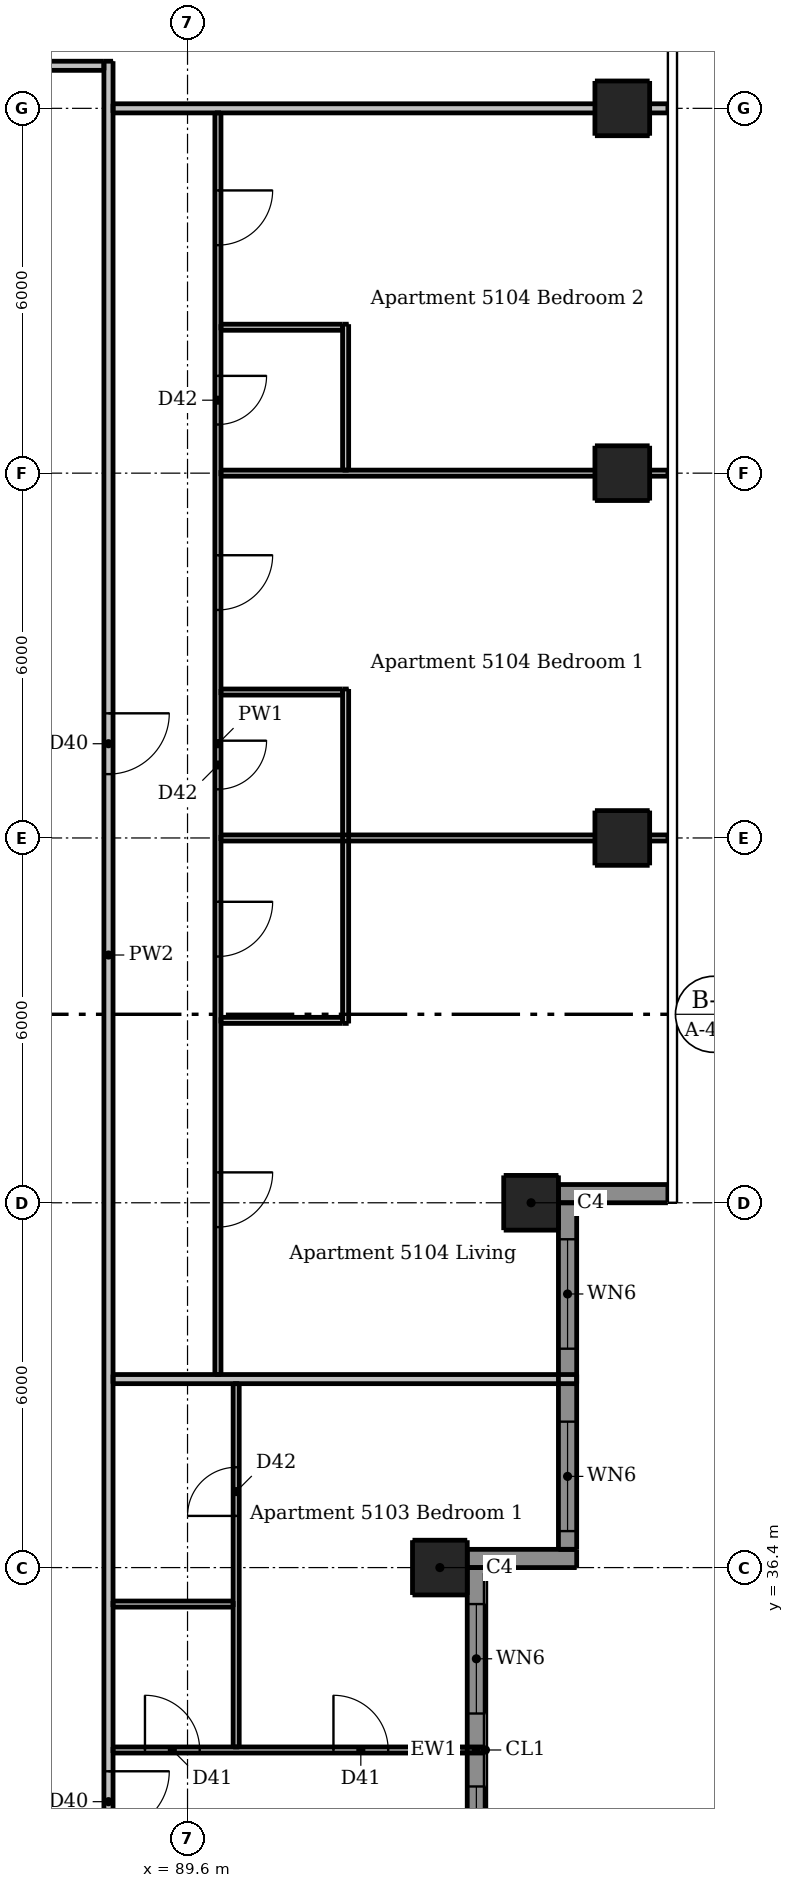
"""IFC4 building model, lengths in metres.
Left out: names, types, materials, properties, quantities, classifications, styles, units other than length and angle.
Written with IfcOpenShell. Run it as: python <this file> out.ifc"""

import sys

from ifc_helpers import new_model, si_unit, direction, frame, frame_2d, origin, origin_2d, place, context, subcontext, project, spatial, rectangle, extrude, element, fill, save


model = new_model("IFC4")
c1 = context("Model", 3, precision=1e-05, world=origin(), true_north=direction((0.0, 1.0)))
c2 = subcontext(c1, "Body", "Model", "MODEL_VIEW")
j1 = project(units=[si_unit("LENGTHUNIT", "METRE"), si_unit("PLANEANGLEUNIT", "RADIAN")], contexts=[c1])
p1 = place(None, origin())
s1 = spatial("IfcSite", under=j1, at=p1, CompositionType="ELEMENT")
p2 = place(p1, origin())
s2 = spatial("IfcBuilding", under=s1, at=p2, CompositionType="ELEMENT")
p3 = place(p2, frame((0.0, 0.0, 193.6)))
s3 = spatial("IfcBuildingStorey", under=s2, at=p3, CompositionType="ELEMENT", Elevation=193.6)
for number, where, z_axis, x_axis in (
    (1, (93.75, 36.4, 0.0), (0.0, 0.0, 1.0), (1.0, 0.0, 0.0)),
    (2, (95.25, 42.4, 0.0), (0.0, 0.0, 1.0), (1.0, 0.0, 0.0)),
    (3, (96.75, 48.4, 0.0), (0.0, 0.0, 1.0), (1.0, 0.0, 0.0)),
    (4, (96.75, 54.4, 0.0), (0.0, 0.0, 1.0), (1.0, 0.0, 0.0)),
    (5, (96.75, 60.4, 0.0), (0.0, 0.0, 1.0), (1.0, 0.0, 0.0)),
):
    element("IfcColumn", number, at=place(p3, frame(where, z_axis=z_axis, x_axis=x_axis)), inside=s3, PredefinedType="COLUMN", context=c2, shape_type="SweptSolid", body=[
        extrude(rectangle(XDim=0.9, YDim=0.9, at=origin_2d()), origin(), (0.0, 0.0, 1.0), 3.05),
    ])
for number, where, z_axis, x_axis in (
    (6, (94.2, 36.55, 0.0), (0.0, 0.0, 1.0), (1.0, 0.0, 0.0)),
    (7, (95.7, 42.55, 0.0), (0.0, 0.0, 1.0), (1.0, 0.0, 0.0)),
):
    element("IfcWall", number, at=place(p3, frame(where, z_axis=z_axis, x_axis=x_axis)), inside=s3, PredefinedType="SOLIDWALL", context=c2, shape_type="SweptSolid", body=[
        extrude(rectangle(XDim=1.8, YDim=0.3, at=frame_2d((0.9, 0.0))), origin(), (0.0, 0.0, 1.0), 3.05),
    ])
p4 = place(p3, frame((94.35, 30.4, 0.0), z_axis=(0.0, 0.0, 1.0), x_axis=(0.0, 1.0, 0.0)))
e8 = element("IfcWall", 8, at=p4, inside=s3, PredefinedType="SOLIDWALL", context=c2, shape_type="SweptSolid", body=[
    extrude(rectangle(XDim=6.0, YDim=0.3, at=frame_2d((3.0, 0.0))), origin(), (0.0, 0.0, 1.0), 3.05),
])
p5 = place(p4, frame((0.6, 0.0, 0.15)))
e9 = element("IfcOpeningElement", 9, at=p5, cuts=e8, PredefinedType="OPENING", context=c2, shape_type="SweptSolid", body=[
    extrude(rectangle(XDim=1.8, YDim=2.1, at=frame_2d((0.9, 1.05))), frame((0.0, 0.16, 0.0), z_axis=(0.0, -1.0, 0.0), x_axis=(1.0, 0.0, 0.0)), (0.0, 0.0, 1.0), 0.32),
])
p6 = place(p4, frame((3.6, 0.0, 0.15)))
e10 = element("IfcOpeningElement", 10, at=p6, cuts=e8, PredefinedType="OPENING", context=c2, shape_type="SweptSolid", body=[
    extrude(rectangle(XDim=1.8, YDim=2.1, at=frame_2d((0.9, 1.05))), frame((0.0, 0.16, 0.0), z_axis=(0.0, -1.0, 0.0), x_axis=(1.0, 0.0, 0.0)), (0.0, 0.0, 1.0), 0.32),
])
p7 = place(p3, frame((95.85, 36.7, 0.0), z_axis=(0.0, 0.0, 1.0), x_axis=(0.0, 1.0, 0.0)))
e11 = element("IfcWall", 11, at=p7, inside=s3, PredefinedType="SOLIDWALL", context=c2, shape_type="SweptSolid", body=[
    extrude(rectangle(XDim=5.7, YDim=0.3, at=frame_2d((2.85, 0.0))), origin(), (0.0, 0.0, 1.0), 3.05),
])
p8 = place(p7, frame((0.3, 0.0, 0.15)))
e12 = element("IfcOpeningElement", 12, at=p8, cuts=e11, PredefinedType="OPENING", context=c2, shape_type="SweptSolid", body=[
    extrude(rectangle(XDim=1.8, YDim=2.1, at=frame_2d((0.9, 1.05))), frame((0.0, 0.16, 0.0), z_axis=(0.0, -1.0, 0.0), x_axis=(1.0, 0.0, 0.0)), (0.0, 0.0, 1.0), 0.32),
])
p9 = place(p7, frame((3.3, 0.0, 0.15)))
e13 = element("IfcOpeningElement", 13, at=p9, cuts=e11, PredefinedType="OPENING", context=c2, shape_type="SweptSolid", body=[
    extrude(rectangle(XDim=1.8, YDim=2.1, at=frame_2d((0.9, 1.05))), frame((0.0, 0.16, 0.0), z_axis=(0.0, -1.0, 0.0), x_axis=(1.0, 0.0, 0.0)), (0.0, 0.0, 1.0), 0.32),
])
p10 = place(p3, frame((90.1, 60.325, 0.0), z_axis=(0.0, 0.0, 1.0), x_axis=(0.0, -1.0, 0.0)))
e14 = element("IfcWall", 14, at=p10, inside=s3, PredefinedType="PARTITIONING", context=c2, shape_type="SweptSolid", body=[
    extrude(rectangle(XDim=20.75, YDim=0.1, at=frame_2d((10.375, 0.0))), origin(), (0.0, 0.0, 1.0), 3.05),
])
p11 = place(p10, frame((17.425, 0.0, 0.0)))
e15 = element("IfcOpeningElement", 15, at=p11, cuts=e14, PredefinedType="OPENING", context=c2, shape_type="SweptSolid", body=[
    extrude(rectangle(XDim=0.9, YDim=2.1, at=frame_2d((0.45, 1.05))), frame((0.0, 0.06, 0.0), z_axis=(0.0, -1.0, 0.0), x_axis=(1.0, 0.0, 0.0)), (0.0, 0.0, 1.0), 0.12),
])
p12 = place(p10, frame((12.975, 0.0, 0.0)))
e16 = element("IfcOpeningElement", 16, at=p12, cuts=e14, PredefinedType="OPENING", context=c2, shape_type="SweptSolid", body=[
    extrude(rectangle(XDim=0.9, YDim=2.1, at=frame_2d((0.45, 1.05))), frame((0.0, 0.06, 0.0), z_axis=(0.0, -1.0, 0.0), x_axis=(1.0, 0.0, 0.0)), (0.0, 0.0, 1.0), 0.12),
])
p13 = place(p10, frame((7.275, 0.0, 0.0)))
e17 = element("IfcOpeningElement", 17, at=p13, cuts=e14, PredefinedType="OPENING", context=c2, shape_type="SweptSolid", body=[
    extrude(rectangle(XDim=0.9, YDim=2.1, at=frame_2d((0.45, 1.05))), frame((0.0, 0.06, 0.0), z_axis=(0.0, -1.0, 0.0), x_axis=(1.0, 0.0, 0.0)), (0.0, 0.0, 1.0), 0.12),
])
p14 = place(p10, frame((1.275, 0.0, 0.0)))
e18 = element("IfcOpeningElement", 18, at=p14, cuts=e14, PredefinedType="OPENING", context=c2, shape_type="SweptSolid", body=[
    extrude(rectangle(XDim=0.9, YDim=2.1, at=frame_2d((0.45, 1.05))), frame((0.0, 0.06, 0.0), z_axis=(0.0, -1.0, 0.0), x_axis=(1.0, 0.0, 0.0)), (0.0, 0.0, 1.0), 0.12),
])
p15 = place(p10, frame((10.325, 0.0, 0.0)))
e19 = element("IfcOpeningElement", 19, at=p15, cuts=e14, PredefinedType="OPENING", context=c2, shape_type="SweptSolid", body=[
    extrude(rectangle(XDim=0.8, YDim=2.1, at=frame_2d((0.4, 1.05))), frame((0.0, 0.06, 0.0), z_axis=(0.0, -1.0, 0.0), x_axis=(1.0, 0.0, 0.0)), (0.0, 0.0, 1.0), 0.12),
])
p16 = place(p10, frame((4.325, 0.0, 0.0)))
e20 = element("IfcOpeningElement", 20, at=p16, cuts=e14, PredefinedType="OPENING", context=c2, shape_type="SweptSolid", body=[
    extrude(rectangle(XDim=0.8, YDim=2.1, at=frame_2d((0.4, 1.05))), frame((0.0, 0.06, 0.0), z_axis=(0.0, -1.0, 0.0), x_axis=(1.0, 0.0, 0.0)), (0.0, 0.0, 1.0), 0.12),
])
p17 = place(p3, frame((90.4, 33.45, 0.0), z_axis=(0.0, 0.0, 1.0), x_axis=(0.0, 1.0, 0.0)))
e21 = element("IfcWall", 21, at=p17, inside=s3, PredefinedType="PARTITIONING", context=c2, shape_type="SweptSolid", body=[
    extrude(rectangle(XDim=5.975, YDim=0.1, at=frame_2d((2.988, 0.0))), origin(), (0.0, 0.0, 1.0), 3.05),
])
p18 = place(p17, frame((3.8, 0.0, 0.0)))
e22 = element("IfcOpeningElement", 22, at=p18, cuts=e21, PredefinedType="OPENING", context=c2, shape_type="SweptSolid", body=[
    extrude(rectangle(XDim=0.8, YDim=2.1, at=frame_2d((0.4, 1.05))), frame((0.0, 0.06, 0.0), z_axis=(0.0, -1.0, 0.0), x_axis=(1.0, 0.0, 0.0)), (0.0, 0.0, 1.0), 0.12),
])
p19 = place(p3, frame((92.2, 45.35, 0.0), z_axis=(0.0, 0.0, 1.0), x_axis=(0.0, 1.0, 0.0)))
e23 = element("IfcWall", 23, at=p19, inside=s3, PredefinedType="PARTITIONING", context=c2, shape_type="SweptSolid", body=[
    extrude(rectangle(XDim=5.5, YDim=0.1, at=frame_2d((2.75, 0.0))), origin(), (0.0, 0.0, 1.0), 3.05),
])
p20 = place(p3, frame((92.2, 54.45, 0.0), z_axis=(0.0, 0.0, 1.0), x_axis=(0.0, 1.0, 0.0)))
e24 = element("IfcWall", 24, at=p20, inside=s3, PredefinedType="PARTITIONING", context=c2, shape_type="SweptSolid", body=[
    extrude(rectangle(XDim=2.4, YDim=0.1, at=frame_2d((1.2, 0.0))), origin(), (0.0, 0.0, 1.0), 3.05),
])
p21 = place(p3, frame((90.15, 56.8, 0.0), z_axis=(0.0, 0.0, 1.0), x_axis=(1.0, 0.0, 0.0)))
e25 = element("IfcWall", 25, at=p21, inside=s3, PredefinedType="PARTITIONING", context=c2, shape_type="SweptSolid", body=[
    extrude(rectangle(XDim=2.0, YDim=0.1, at=frame_2d((1.0, 0.0))), origin(), (0.0, 0.0, 1.0), 3.05),
])
p22 = place(p3, frame((90.15, 54.4, 0.0), z_axis=(0.0, 0.0, 1.0), x_axis=(1.0, 0.0, 0.0)))
e26 = element("IfcWall", 26, at=p22, inside=s3, PredefinedType="PARTITIONING", context=c2, shape_type="SweptSolid", body=[
    extrude(rectangle(XDim=7.35, YDim=0.1, at=frame_2d((3.675, 0.0))), origin(), (0.0, 0.0, 1.0), 2.516),
])
p23 = place(p3, frame((90.15, 50.8, 0.0), z_axis=(0.0, 0.0, 1.0), x_axis=(1.0, 0.0, 0.0)))
e27 = element("IfcWall", 27, at=p23, inside=s3, PredefinedType="PARTITIONING", context=c2, shape_type="SweptSolid", body=[
    extrude(rectangle(XDim=2.0, YDim=0.1, at=frame_2d((1.0, 0.0))), origin(), (0.0, 0.0, 1.0), 3.05),
])
p24 = place(p3, frame((90.15, 48.4, 0.0), z_axis=(0.0, 0.0, 1.0), x_axis=(1.0, 0.0, 0.0)))
e28 = element("IfcWall", 28, at=p24, inside=s3, PredefinedType="PARTITIONING", context=c2, shape_type="SweptSolid", body=[
    extrude(rectangle(XDim=7.35, YDim=0.1, at=frame_2d((3.675, 0.0))), origin(), (0.0, 0.0, 1.0), 2.516),
])
p25 = place(p3, frame((90.15, 45.4, 0.0), z_axis=(0.0, 0.0, 1.0), x_axis=(1.0, 0.0, 0.0)))
e29 = element("IfcWall", 29, at=p25, inside=s3, PredefinedType="PARTITIONING", context=c2, shape_type="SweptSolid", body=[
    extrude(rectangle(XDim=2.0, YDim=0.1, at=frame_2d((1.0, 0.0))), origin(), (0.0, 0.0, 1.0), 3.05),
])
p26 = place(p3, frame((88.375, 35.8, 0.0), z_axis=(0.0, 0.0, 1.0), x_axis=(1.0, 0.0, 0.0)))
e30 = element("IfcWall", 30, at=p26, inside=s3, PredefinedType="PARTITIONING", context=c2, shape_type="SweptSolid", body=[
    extrude(rectangle(XDim=1.975, YDim=0.1, at=frame_2d((0.988, 0.0))), origin(), (0.0, 0.0, 1.0), 3.05),
])
p27 = place(p3, frame((88.375, 33.4, 0.0), z_axis=(0.0, 0.0, 1.0), x_axis=(1.0, 0.0, 0.0)))
e31 = element("IfcWall", 31, at=p27, inside=s3, PredefinedType="PARTITIONING", context=c2, shape_type="SweptSolid", body=[
    extrude(rectangle(XDim=6.125, YDim=0.1, at=frame_2d((3.062, 0.0))), origin(), (0.0, 0.0, 1.0), 3.05),
])
p28 = place(p27, frame((0.525, 0.0, 0.0)))
e32 = element("IfcOpeningElement", 32, at=p28, cuts=e31, PredefinedType="OPENING", context=c2, shape_type="SweptSolid", body=[
    extrude(rectangle(XDim=0.9, YDim=2.1, at=frame_2d((0.45, 1.05))), frame((0.0, 0.06, 0.0), z_axis=(0.0, -1.0, 0.0), x_axis=(1.0, 0.0, 0.0)), (0.0, 0.0, 1.0), 0.12),
])
p29 = place(p27, frame((3.625, 0.0, 0.0)))
e33 = element("IfcOpeningElement", 33, at=p29, cuts=e31, PredefinedType="OPENING", context=c2, shape_type="SweptSolid", body=[
    extrude(rectangle(XDim=0.9, YDim=2.1, at=frame_2d((0.45, 1.05))), frame((0.0, 0.06, 0.0), z_axis=(0.0, -1.0, 0.0), x_axis=(1.0, 0.0, 0.0)), (0.0, 0.0, 1.0), 0.12),
])
p30 = place(p3, frame((88.3, 61.175, 0.0), z_axis=(0.0, 0.0, 1.0), x_axis=(0.0, -1.0, 0.0)))
e34 = element("IfcWall", 34, at=p30, inside=s3, PredefinedType="PARTITIONING", context=c2, shape_type="SweptSolid", body=[
    extrude(rectangle(XDim=29.4, YDim=0.15, at=frame_2d((14.7, 0.0))), origin(), (0.0, 0.0, 1.0), 3.05),
])
p31 = place(p30, frame((28.125, 0.0, 0.0)))
e35 = element("IfcOpeningElement", 35, at=p31, cuts=e34, PredefinedType="OPENING", context=c2, shape_type="SweptSolid", body=[
    extrude(rectangle(XDim=1.0, YDim=2.1, at=frame_2d((0.5, 1.05))), frame((0.0, 0.085, 0.0), z_axis=(0.0, -1.0, 0.0), x_axis=(1.0, 0.0, 0.0)), (0.0, 0.0, 1.0), 0.17),
])
p32 = place(p30, frame((10.725, 0.0, 0.0)))
e36 = element("IfcOpeningElement", 36, at=p32, cuts=e34, PredefinedType="OPENING", context=c2, shape_type="SweptSolid", body=[
    extrude(rectangle(XDim=1.0, YDim=2.1, at=frame_2d((0.5, 1.05))), frame((0.0, 0.085, 0.0), z_axis=(0.0, -1.0, 0.0), x_axis=(1.0, 0.0, 0.0)), (0.0, 0.0, 1.0), 0.17),
])
p33 = place(p3, frame((58.975, 61.1, 0.0), z_axis=(0.0, 0.0, 1.0), x_axis=(1.0, 0.0, 0.0)))
e37 = element("IfcWall", 37, at=p33, inside=s3, PredefinedType="PARTITIONING", context=c2, shape_type="SweptSolid", body=[
    extrude(rectangle(XDim=29.25, YDim=0.15, at=frame_2d((14.625, 0.0))), origin(), (0.0, 0.0, 1.0), 3.05),
])
p34 = place(p33, frame((9.125, 0.0, 0.0)))
e38 = element("IfcOpeningElement", 38, at=p34, cuts=e37, PredefinedType="OPENING", context=c2, shape_type="SweptSolid", body=[
    extrude(rectangle(XDim=1.0, YDim=2.1, at=frame_2d((0.5, 1.05))), frame((0.0, 0.085, 0.0), z_axis=(0.0, -1.0, 0.0), x_axis=(1.0, 0.0, 0.0)), (0.0, 0.0, 1.0), 0.17),
])
p35 = place(p33, frame((26.475, 0.0, 0.0)))
e39 = element("IfcOpeningElement", 39, at=p35, cuts=e37, PredefinedType="OPENING", context=c2, shape_type="SweptSolid", body=[
    extrude(rectangle(XDim=1.0, YDim=2.1, at=frame_2d((0.5, 1.05))), frame((0.0, 0.085, 0.0), z_axis=(0.0, -1.0, 0.0), x_axis=(1.0, 0.0, 0.0)), (0.0, 0.0, 1.0), 0.17),
])
p36 = place(p3, frame((88.375, 60.4, 0.0), z_axis=(0.0, 0.0, 1.0), x_axis=(1.0, 0.0, 0.0)))
e40 = element("IfcWall", 40, at=p36, inside=s3, PredefinedType="PARTITIONING", context=c2, shape_type="SweptSolid", body=[
    extrude(rectangle(XDim=9.125, YDim=0.15, at=frame_2d((4.562, 0.0))), origin(), (0.0, 0.0, 1.0), 2.59),
])
p37 = place(p3, frame((88.375, 39.5, 0.0), z_axis=(0.0, 0.0, 1.0), x_axis=(1.0, 0.0, 0.0)))
e41 = element("IfcWall", 41, at=p37, inside=s3, PredefinedType="PARTITIONING", context=c2, shape_type="SweptSolid", body=[
    extrude(rectangle(XDim=7.625, YDim=0.15, at=frame_2d((3.812, 0.0))), origin(), (0.0, 0.0, 1.0), 3.05),
])
p38 = place(p5, origin())
e42 = element("IfcWindow", 42, at=p38, inside=s3, PartitioningType="DOUBLE_PANEL_VERTICAL", PredefinedType="WINDOW", context=c2, shape_type="SweptSolid", body=[
    extrude(rectangle(XDim=1.8, YDim=2.1, at=frame_2d((0.9, 1.05))), frame((0.0, 0.03, 0.0), z_axis=(0.0, -1.0, 0.0), x_axis=(1.0, 0.0, 0.0)), (0.0, 0.0, 1.0), 0.06),
])
fill(e9, e42)
p39 = place(p6, origin())
e43 = element("IfcWindow", 43, at=p39, inside=s3, PartitioningType="DOUBLE_PANEL_VERTICAL", PredefinedType="WINDOW", context=c2, shape_type="SweptSolid", body=[
    extrude(rectangle(XDim=1.8, YDim=2.1, at=frame_2d((0.9, 1.05))), frame((0.0, 0.03, 0.0), z_axis=(0.0, -1.0, 0.0), x_axis=(1.0, 0.0, 0.0)), (0.0, 0.0, 1.0), 0.06),
])
fill(e10, e43)
p40 = place(p8, origin())
e44 = element("IfcWindow", 44, at=p40, inside=s3, PartitioningType="DOUBLE_PANEL_VERTICAL", PredefinedType="WINDOW", context=c2, shape_type="SweptSolid", body=[
    extrude(rectangle(XDim=1.8, YDim=2.1, at=frame_2d((0.9, 1.05))), frame((0.0, 0.03, 0.0), z_axis=(0.0, -1.0, 0.0), x_axis=(1.0, 0.0, 0.0)), (0.0, 0.0, 1.0), 0.06),
])
fill(e12, e44)
p41 = place(p9, origin())
e45 = element("IfcWindow", 45, at=p41, inside=s3, PartitioningType="DOUBLE_PANEL_VERTICAL", PredefinedType="WINDOW", context=c2, shape_type="SweptSolid", body=[
    extrude(rectangle(XDim=1.8, YDim=2.1, at=frame_2d((0.9, 1.05))), frame((0.0, 0.03, 0.0), z_axis=(0.0, -1.0, 0.0), x_axis=(1.0, 0.0, 0.0)), (0.0, 0.0, 1.0), 0.06),
])
fill(e13, e45)
p42 = place(p31, origin())
e46 = element("IfcDoor", 46, at=p42, inside=s3, OperationType="SINGLE_SWING_LEFT", PredefinedType="DOOR", context=c2, shape_type="SweptSolid", body=[
    extrude(rectangle(XDim=1.0, YDim=2.1, at=frame_2d((0.5, 1.05))), frame((0.0, 0.025, 0.0), z_axis=(0.0, -1.0, 0.0), x_axis=(1.0, 0.0, 0.0)), (0.0, 0.0, 1.0), 0.05),
])
fill(e35, e46)
p43 = place(p28, origin())
e47 = element("IfcDoor", 47, at=p43, inside=s3, OperationType="SINGLE_SWING_LEFT", PredefinedType="DOOR", context=c2, shape_type="SweptSolid", body=[
    extrude(rectangle(XDim=0.9, YDim=2.1, at=frame_2d((0.45, 1.05))), frame((0.0, 0.025, 0.0), z_axis=(0.0, -1.0, 0.0), x_axis=(1.0, 0.0, 0.0)), (0.0, 0.0, 1.0), 0.05),
])
fill(e32, e47)
p44 = place(p29, origin())
e48 = element("IfcDoor", 48, at=p44, inside=s3, OperationType="SINGLE_SWING_LEFT", PredefinedType="DOOR", context=c2, shape_type="SweptSolid", body=[
    extrude(rectangle(XDim=0.9, YDim=2.1, at=frame_2d((0.45, 1.05))), frame((0.0, 0.025, 0.0), z_axis=(0.0, -1.0, 0.0), x_axis=(1.0, 0.0, 0.0)), (0.0, 0.0, 1.0), 0.05),
])
fill(e33, e48)
p45 = place(p18, origin())
e49 = element("IfcDoor", 49, at=p45, inside=s3, OperationType="SINGLE_SWING_LEFT", PredefinedType="DOOR", context=c2, shape_type="SweptSolid", body=[
    extrude(rectangle(XDim=0.8, YDim=2.1, at=frame_2d((0.4, 1.05))), frame((0.0, 0.025, 0.0), z_axis=(0.0, -1.0, 0.0), x_axis=(1.0, 0.0, 0.0)), (0.0, 0.0, 1.0), 0.05),
])
fill(e22, e49)
p46 = place(p32, origin())
e50 = element("IfcDoor", 50, at=p46, inside=s3, OperationType="SINGLE_SWING_LEFT", PredefinedType="DOOR", context=c2, shape_type="SweptSolid", body=[
    extrude(rectangle(XDim=1.0, YDim=2.1, at=frame_2d((0.5, 1.05))), frame((0.0, 0.025, 0.0), z_axis=(0.0, -1.0, 0.0), x_axis=(1.0, 0.0, 0.0)), (0.0, 0.0, 1.0), 0.05),
])
fill(e36, e50)
p47 = place(p11, origin())
e51 = element("IfcDoor", 51, at=p47, inside=s3, OperationType="SINGLE_SWING_LEFT", PredefinedType="DOOR", context=c2, shape_type="SweptSolid", body=[
    extrude(rectangle(XDim=0.9, YDim=2.1, at=frame_2d((0.45, 1.05))), frame((0.0, 0.025, 0.0), z_axis=(0.0, -1.0, 0.0), x_axis=(1.0, 0.0, 0.0)), (0.0, 0.0, 1.0), 0.05),
])
fill(e15, e51)
p48 = place(p12, origin())
e52 = element("IfcDoor", 52, at=p48, inside=s3, OperationType="SINGLE_SWING_LEFT", PredefinedType="DOOR", context=c2, shape_type="SweptSolid", body=[
    extrude(rectangle(XDim=0.9, YDim=2.1, at=frame_2d((0.45, 1.05))), frame((0.0, 0.025, 0.0), z_axis=(0.0, -1.0, 0.0), x_axis=(1.0, 0.0, 0.0)), (0.0, 0.0, 1.0), 0.05),
])
fill(e16, e52)
p49 = place(p13, origin())
e53 = element("IfcDoor", 53, at=p49, inside=s3, OperationType="SINGLE_SWING_LEFT", PredefinedType="DOOR", context=c2, shape_type="SweptSolid", body=[
    extrude(rectangle(XDim=0.9, YDim=2.1, at=frame_2d((0.45, 1.05))), frame((0.0, 0.025, 0.0), z_axis=(0.0, -1.0, 0.0), x_axis=(1.0, 0.0, 0.0)), (0.0, 0.0, 1.0), 0.05),
])
fill(e17, e53)
p50 = place(p14, origin())
e54 = element("IfcDoor", 54, at=p50, inside=s3, OperationType="SINGLE_SWING_LEFT", PredefinedType="DOOR", context=c2, shape_type="SweptSolid", body=[
    extrude(rectangle(XDim=0.9, YDim=2.1, at=frame_2d((0.45, 1.05))), frame((0.0, 0.025, 0.0), z_axis=(0.0, -1.0, 0.0), x_axis=(1.0, 0.0, 0.0)), (0.0, 0.0, 1.0), 0.05),
])
fill(e18, e54)
p51 = place(p15, origin())
e55 = element("IfcDoor", 55, at=p51, inside=s3, OperationType="SINGLE_SWING_LEFT", PredefinedType="DOOR", context=c2, shape_type="SweptSolid", body=[
    extrude(rectangle(XDim=0.8, YDim=2.1, at=frame_2d((0.4, 1.05))), frame((0.0, 0.025, 0.0), z_axis=(0.0, -1.0, 0.0), x_axis=(1.0, 0.0, 0.0)), (0.0, 0.0, 1.0), 0.05),
])
fill(e19, e55)
p52 = place(p16, origin())
e56 = element("IfcDoor", 56, at=p52, inside=s3, OperationType="SINGLE_SWING_LEFT", PredefinedType="DOOR", context=c2, shape_type="SweptSolid", body=[
    extrude(rectangle(XDim=0.8, YDim=2.1, at=frame_2d((0.4, 1.05))), frame((0.0, 0.025, 0.0), z_axis=(0.0, -1.0, 0.0), x_axis=(1.0, 0.0, 0.0)), (0.0, 0.0, 1.0), 0.05),
])
fill(e20, e56)
save(model, sys.argv[1])
